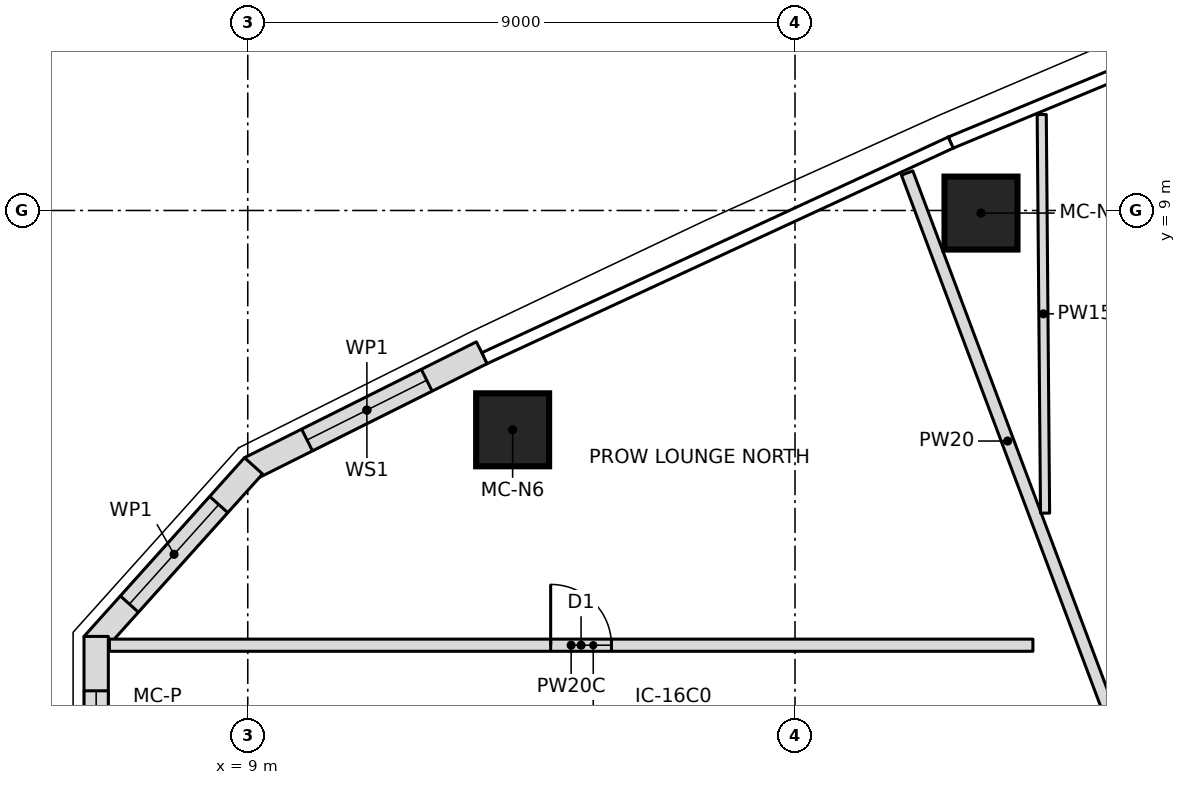
"""IFC4 building model, lengths in metres.
Left out: names, types, materials, properties, quantities, classifications, styles, units other than length and angle.
Written with IfcOpenShell. Run it as: python <this file> out.ifc"""

import sys

from ifc_helpers import new_model, si_unit, direction, frame, frame_2d, origin, origin_2d, place, context, subcontext, project, spatial, polyline, rectangle, outline, extrude, element, fill, save


model = new_model("IFC4")
c1 = context("Model", 3, precision=1e-05, world=origin(), true_north=direction((0.0, 1.0)))
c2 = subcontext(c1, "Body", "Model", "MODEL_VIEW")
j1 = project(units=[si_unit("LENGTHUNIT", "METRE"), si_unit("PLANEANGLEUNIT", "RADIAN")], contexts=[c1])
p1 = place(None, origin())
s1 = spatial("IfcSite", under=j1, at=p1, CompositionType="ELEMENT")
p2 = place(p1, origin())
s2 = spatial("IfcBuilding", under=s1, at=p2, CompositionType="ELEMENT")
p3 = place(p2, frame((0.0, 0.0, 220.8)))
s3 = spatial("IfcBuildingStorey", under=s2, at=p3, CompositionType="ELEMENT", Elevation=220.8)
for number, where, z_axis, x_axis in (
    (1, (21.059, 8.958, 0.0), (0.0, 0.0, 1.0), (1.0, 0.0, 0.0)),
    (2, (13.356, 5.393, 0.0), (0.0, 0.0, 1.0), (1.0, 0.0, 0.0)),
):
    element("IfcColumn", number, at=place(p3, frame(where, z_axis=z_axis, x_axis=x_axis)), inside=s3, PredefinedType="COLUMN", context=c2, shape_type="SweptSolid", body=[
        extrude(rectangle(XDim=1.2, YDim=1.2, at=origin_2d()), origin(), (0.0, 0.0, 1.0), 3.55),
    ])
p4 = place(p3, frame((12.849, 6.661, 0.0), z_axis=(0.0, 0.0, 1.0), x_axis=(-0.894554263274, -0.446959360634, 0.0)))
e3 = element("IfcWall", 3, at=p4, inside=s3, PredefinedType="NOTDEFINED", context=c2, shape_type="SweptSolid", body=[
    extrude(outline(polyline([(0.0, -0.2), (4.264, -0.2), (4.188, 0.2), (0.0, 0.2), (0.0, -0.2)])), origin(), (0.0, 0.0, 1.0), 3.25),
])
p5 = place(p4, frame((1.013, 0.0, 0.6)))
e4 = element("IfcOpeningElement", 4, at=p5, cuts=e3, PredefinedType="OPENING", context=c2, shape_type="SweptSolid", body=[
    extrude(outline(polyline([(0.0, 1.35), (0.084, 1.771), (0.322, 2.128), (0.679, 2.366), (1.1, 2.45), (1.521, 2.366), (1.878, 2.128), (2.116, 1.771), (2.2, 1.35), (2.2, 1.1), (2.116, 0.679), (1.878, 0.322), (1.521, 0.084), (1.1, 0.0), (0.679, 0.084), (0.322, 0.322), (0.084, 0.679), (0.0, 1.1), (0.0, 1.35)])), frame((0.0, 0.21, 0.0), z_axis=(0.0, -1.0, 0.0), x_axis=(1.0, 0.0, 0.0)), (0.0, 0.0, 1.0), 0.42),
])
p6 = place(p3, frame((9.069, 4.772, 0.0), z_axis=(0.0, 0.0, 1.0), x_axis=(-0.668018215058, -0.744144921605, 0.0)))
e5 = element("IfcWall", 5, at=p6, inside=s3, PredefinedType="NOTDEFINED", context=c2, shape_type="SweptSolid", body=[
    extrude(outline(polyline([(-0.038, -0.2), (3.912, -0.2), (3.759, 0.2), (0.038, 0.2), (-0.038, -0.2)])), origin(), (0.0, 0.0, 1.0), 3.25),
])
p7 = place(p6, frame((0.818, 0.0, 0.6)))
e6 = element("IfcOpeningElement", 6, at=p7, cuts=e5, PredefinedType="OPENING", context=c2, shape_type="SweptSolid", body=[
    extrude(outline(polyline([(0.0, 1.35), (0.084, 1.771), (0.322, 2.128), (0.679, 2.366), (1.1, 2.45), (1.521, 2.366), (1.878, 2.128), (2.116, 1.771), (2.2, 1.35), (2.2, 1.1), (2.116, 0.679), (1.878, 0.322), (1.521, 0.084), (1.1, 0.0), (0.679, 0.084), (0.322, 0.322), (0.084, 0.679), (0.0, 1.1), (0.0, 1.35)])), frame((0.0, 0.21, 0.0), z_axis=(0.0, -1.0, 0.0), x_axis=(1.0, 0.0, 0.0)), (0.0, 0.0, 1.0), 0.42),
])
p8 = place(p3, frame((6.507, 1.918, 0.0), z_axis=(0.0, 0.0, 1.0), x_axis=(0.0, -1.0, 0.0)))
e7 = element("IfcWall", 7, at=p8, inside=s3, PredefinedType="NOTDEFINED", context=c2, shape_type="SweptSolid", body=[
    extrude(outline(polyline([(-0.077, -0.2), (3.912, -0.2), (3.759, 0.2), (0.077, 0.2), (-0.077, -0.2)])), origin(), (0.0, 0.0, 1.0), 3.25),
])
p9 = place(p8, frame((0.818, 0.0, 0.6)))
e8 = element("IfcOpeningElement", 8, at=p9, cuts=e7, PredefinedType="OPENING", context=c2, shape_type="SweptSolid", body=[
    extrude(outline(polyline([(0.0, 1.35), (0.084, 1.771), (0.322, 2.128), (0.679, 2.366), (1.1, 2.45), (1.521, 2.366), (1.878, 2.128), (2.116, 1.771), (2.2, 1.35), (2.2, 1.1), (2.116, 0.679), (1.878, 0.322), (1.521, 0.084), (1.1, 0.0), (0.679, 0.084), (0.322, 0.322), (0.084, 0.679), (0.0, 1.1), (0.0, 1.35)])), frame((0.0, 0.21, 0.0), z_axis=(0.0, -1.0, 0.0), x_axis=(1.0, 0.0, 0.0)), (0.0, 0.0, 1.0), 0.42),
])
p10 = place(p3, frame((6.725, 1.85, 0.0), z_axis=(0.0, 0.0, 1.0), x_axis=(1.0, 0.0, 0.0)))
e9 = element("IfcWall", 9, at=p10, inside=s3, PredefinedType="PARTITIONING", context=c2, shape_type="SweptSolid", body=[
    extrude(rectangle(XDim=15.188, YDim=0.2, at=frame_2d((7.594, 0.0))), origin(), (0.0, 0.0, 1.0), 3.25),
])
p11 = place(p10, frame((7.257, 0.0, 0.0)))
e10 = element("IfcOpeningElement", 10, at=p11, cuts=e9, PredefinedType="OPENING", context=c2, shape_type="SweptSolid", body=[
    extrude(rectangle(XDim=1.0, YDim=2.1, at=frame_2d((0.5, 1.05))), frame((0.0, 0.11, 0.0), z_axis=(0.0, -1.0, 0.0), x_axis=(1.0, 0.0, 0.0)), (0.0, 0.0, 1.0), 0.22),
])
p12 = place(p3, frame((23.15, 0.8, 0.0), z_axis=(0.0, 0.0, 1.0), x_axis=(-0.351123441588, 0.936329177569, 0.0)))
e11 = element("IfcWall", 11, at=p12, inside=s3, PredefinedType="PARTITIONING", context=c2, shape_type="SweptSolid", body=[
    extrude(rectangle(XDim=9.416, YDim=0.2, at=frame_2d((4.708, 0.0))), origin(), (0.0, 0.0, 1.0), 3.25),
])
p13 = place(p3, frame((22.057, 10.578, 0.0), z_axis=(0.0, 0.0, 1.0), x_axis=(0.008379594055, -0.999964890585, 0.0)))
e12 = element("IfcWall", 12, at=p13, inside=s3, PredefinedType="PARTITIONING", context=c2, shape_type="SweptSolid", body=[
    extrude(rectangle(XDim=6.555, YDim=0.15, at=frame_2d((3.278, 0.0))), origin(), (0.0, 0.0, 1.0), 3.25),
])
p14 = place(p5, origin())
e13 = element("IfcWindow", 13, at=p14, inside=s3, PartitioningType="SINGLE_PANEL", PredefinedType="WINDOW", context=c2, shape_type="SweptSolid", body=[
    extrude(outline(polyline([(0.0, 1.35), (0.084, 1.771), (0.322, 2.128), (0.679, 2.366), (1.1, 2.45), (1.521, 2.366), (1.878, 2.128), (2.116, 1.771), (2.2, 1.35), (2.2, 1.1), (2.116, 0.679), (1.878, 0.322), (1.521, 0.084), (1.1, 0.0), (0.679, 0.084), (0.322, 0.322), (0.084, 0.679), (0.0, 1.1), (0.0, 1.35)])), frame((0.0, 0.17, 0.0), z_axis=(0.0, -1.0, 0.0), x_axis=(1.0, 0.0, 0.0)), (0.0, 0.0, 1.0), 0.06),
])
fill(e4, e13)
p15 = place(p7, origin())
e14 = element("IfcWindow", 14, at=p15, inside=s3, PartitioningType="SINGLE_PANEL", PredefinedType="WINDOW", context=c2, shape_type="SweptSolid", body=[
    extrude(outline(polyline([(0.0, 1.35), (0.084, 1.771), (0.322, 2.128), (0.679, 2.366), (1.1, 2.45), (1.521, 2.366), (1.878, 2.128), (2.116, 1.771), (2.2, 1.35), (2.2, 1.1), (2.116, 0.679), (1.878, 0.322), (1.521, 0.084), (1.1, 0.0), (0.679, 0.084), (0.322, 0.322), (0.084, 0.679), (0.0, 1.1), (0.0, 1.35)])), frame((0.0, 0.17, 0.0), z_axis=(0.0, -1.0, 0.0), x_axis=(1.0, 0.0, 0.0)), (0.0, 0.0, 1.0), 0.06),
])
fill(e6, e14)
p16 = place(p9, origin())
e15 = element("IfcWindow", 15, at=p16, inside=s3, PartitioningType="SINGLE_PANEL", PredefinedType="WINDOW", context=c2, shape_type="SweptSolid", body=[
    extrude(outline(polyline([(0.0, 1.35), (0.084, 1.771), (0.322, 2.128), (0.679, 2.366), (1.1, 2.45), (1.521, 2.366), (1.878, 2.128), (2.116, 1.771), (2.2, 1.35), (2.2, 1.1), (2.116, 0.679), (1.878, 0.322), (1.521, 0.084), (1.1, 0.0), (0.679, 0.084), (0.322, 0.322), (0.084, 0.679), (0.0, 1.1), (0.0, 1.35)])), frame((0.0, 0.17, 0.0), z_axis=(0.0, -1.0, 0.0), x_axis=(1.0, 0.0, 0.0)), (0.0, 0.0, 1.0), 0.06),
])
fill(e8, e15)
p17 = place(p11, origin())
e16 = element("IfcDoor", 16, at=p17, inside=s3, OperationType="SINGLE_SWING_LEFT", PredefinedType="DOOR", context=c2, shape_type="SweptSolid", body=[
    extrude(rectangle(XDim=1.0, YDim=2.1, at=frame_2d((0.5, 1.05))), frame((0.0, 0.025, 0.0), z_axis=(0.0, -1.0, 0.0), x_axis=(1.0, 0.0, 0.0)), (0.0, 0.0, 1.0), 0.05),
])
fill(e10, e16)
save(model, sys.argv[1])
